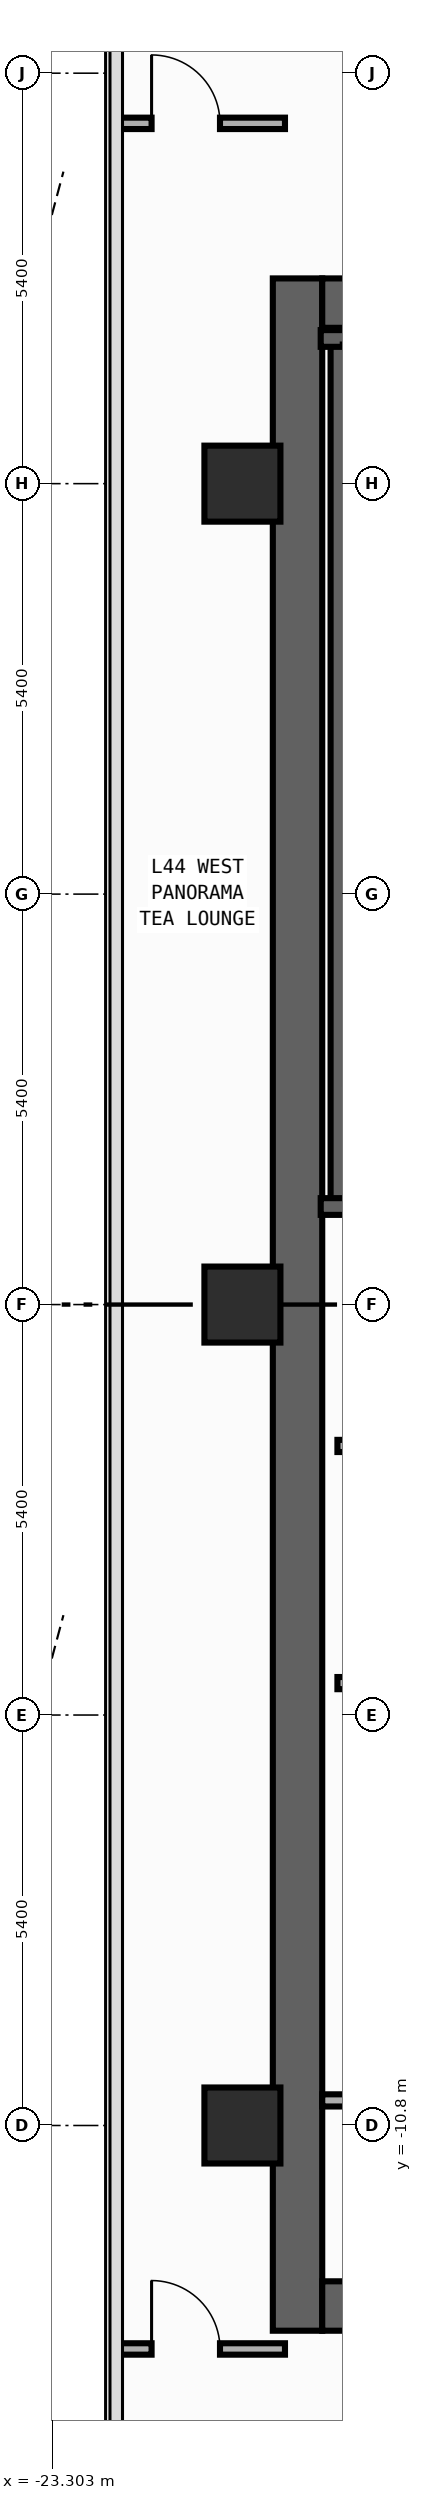
"""IFC4 building model, lengths in metres.
Left out: names, types, materials, properties, quantities, classifications, styles, units other than length and angle.
Written with IfcOpenShell. Run it as: python <this file> out.ifc"""

import sys

from ifc_helpers import new_model, si_unit, direction, frame, frame_2d, origin, origin_2d, place, context, subcontext, project, spatial, rectangle, extrude, element, fill, save


model = new_model("IFC4")
c1 = context("Model", 3, precision=1e-05, world=origin(), true_north=direction((0.0, 1.0)))
c2 = subcontext(c1, "Body", "Model", "MODEL_VIEW")
j1 = project(units=[si_unit("LENGTHUNIT", "METRE"), si_unit("PLANEANGLEUNIT", "RADIAN")], contexts=[c1])
p1 = place(None, origin())
s1 = spatial("IfcSite", under=j1, at=p1, CompositionType="ELEMENT")
p2 = place(p1, origin())
s2 = spatial("IfcBuilding", under=s1, at=p2, CompositionType="ELEMENT")
p3 = place(p2, frame((0.0, 0.0, 191.6)))
s3 = spatial("IfcBuildingStorey", under=s2, at=p3, CompositionType="ELEMENT", Elevation=191.6)
p4 = place(p3, frame((-20.075, -13.5, 0.0), z_axis=(0.0, 0.0, 1.0), x_axis=(0.0, 1.0, 0.0)))
e1 = element("IfcWall", 1, at=p4, inside=s3, PredefinedType="SHEAR", context=c2, shape_type="SweptSolid", body=[
    extrude(rectangle(XDim=27.0, YDim=0.65, at=frame_2d((13.5, 0.0))), origin(), (0.0, 0.0, 1.0), 3.54),
])
for number, where, z_axis, x_axis in (
    (2, (-19.75, -13.175, 0.0), (0.0, 0.0, 1.0), (1.0, 0.0, 0.0)),
    (3, (-19.75, 13.175, 0.0), (0.0, 0.0, 1.0), (1.0, 0.0, 0.0)),
):
    element("IfcWall", number, at=place(p3, frame(where, z_axis=z_axis, x_axis=x_axis)), inside=s3, PredefinedType="SHEAR", context=c2, shape_type="SweptSolid", body=[
        extrude(rectangle(XDim=7.1, YDim=0.65, at=frame_2d((3.55, 0.0))), origin(), (0.0, 0.0, 1.0), 3.54),
    ])
p5 = place(p3, frame((-19.53, 1.29, 0.0), z_axis=(0.0, 0.0, 1.0), x_axis=(0.0, 1.0, 0.0)))
e4 = element("IfcWall", 4, at=p5, inside=s3, PredefinedType="SHEAR", context=c2, shape_type="SweptSolid", body=[
    extrude(rectangle(XDim=11.42, YDim=0.22, at=frame_2d((5.71, 0.0))), origin(), (0.0, 0.0, 1.0), 3.54),
])
p6 = place(p3, frame((-19.77, 12.71, 0.0), z_axis=(0.0, 0.0, 1.0), x_axis=(1.0, 0.0, 0.0)))
e5 = element("IfcWall", 5, at=p6, inside=s3, PredefinedType="SHEAR", context=c2, shape_type="SweptSolid", body=[
    extrude(rectangle(XDim=4.065, YDim=0.22, at=frame_2d((2.032, 0.0))), origin(), (0.0, 0.0, 1.0), 3.54),
])
p7 = place(p3, frame((-19.77, 1.29, 0.0), z_axis=(0.0, 0.0, 1.0), x_axis=(1.0, 0.0, 0.0)))
e6 = element("IfcWall", 6, at=p7, inside=s3, PredefinedType="SHEAR", context=c2, shape_type="SweptSolid", body=[
    extrude(rectangle(XDim=4.065, YDim=0.22, at=frame_2d((2.032, 0.0))), origin(), (0.0, 0.0, 1.0), 3.54),
])
p8 = place(p7, frame((1.08, 0.0, 0.0)))
e7 = element("IfcOpeningElement", 7, at=p8, cuts=e6, PredefinedType="OPENING", context=c2, shape_type="SweptSolid", body=[
    extrude(rectangle(XDim=1.1, YDim=2.2, at=frame_2d((0.55, 1.1))), frame((0.0, 0.12, 0.0), z_axis=(0.0, -1.0, 0.0), x_axis=(1.0, 0.0, 0.0)), (0.0, 0.0, 1.0), 0.24),
])
for number, where, z_axis, x_axis in (
    (8, (-20.8, -10.8, 0.0), (0.0, 0.0, 1.0), (1.0, 0.0, 0.0)),
    (9, (-20.8, 0.0, 0.0), (0.0, 0.0, 1.0), (1.0, 0.0, 0.0)),
    (10, (-20.8, 10.8, 0.0), (0.0, 0.0, 1.0), (1.0, 0.0, 0.0)),
):
    element("IfcColumn", number, at=place(p3, frame(where, z_axis=z_axis, x_axis=x_axis)), inside=s3, PredefinedType="COLUMN", context=c2, shape_type="SweptSolid", body=[
        extrude(rectangle(XDim=1.0, YDim=1.0, at=origin_2d()), origin(), (0.0, 0.0, 1.0), 3.8),
    ])
p9 = place(p3, frame((-19.55, -1.86, 0.0), z_axis=(0.0, 0.0, 1.0), x_axis=(1.0, 0.0, 0.0)))
e11 = element("IfcWall", 11, at=p9, inside=s3, PredefinedType="STANDARD", context=c2, shape_type="SweptSolid", body=[
    extrude(rectangle(XDim=3.8, YDim=0.16, at=frame_2d((1.9, 0.0))), origin(), (0.0, 0.0, 1.0), 3.54),
])
p10 = place(p9, frame((1.18, 0.0, 0.0)))
e12 = element("IfcOpeningElement", 12, at=p10, cuts=e11, PredefinedType="OPENING", context=c2, shape_type="SweptSolid", body=[
    extrude(rectangle(XDim=1.15, YDim=2.2, at=frame_2d((0.575, 1.1))), frame((0.0, 0.09, 0.0), z_axis=(0.0, -1.0, 0.0), x_axis=(1.0, 0.0, 0.0)), (0.0, 0.0, 1.0), 0.18),
])
p11 = place(p3, frame((-19.55, -4.98, 0.0), z_axis=(0.0, 0.0, 1.0), x_axis=(1.0, 0.0, 0.0)))
e13 = element("IfcWall", 13, at=p11, inside=s3, PredefinedType="STANDARD", context=c2, shape_type="SweptSolid", body=[
    extrude(rectangle(XDim=3.8, YDim=0.16, at=frame_2d((1.9, 0.0))), origin(), (0.0, 0.0, 1.0), 3.54),
])
p12 = place(p3, frame((-19.75, -10.47, 0.0), z_axis=(0.0, 0.0, 1.0), x_axis=(1.0, 0.0, 0.0)))
e14 = element("IfcWall", 14, at=p12, inside=s3, PredefinedType="PARTITIONING", context=c2, shape_type="SweptSolid", body=[
    extrude(rectangle(XDim=2.44, YDim=0.16, at=frame_2d((1.22, 0.0))), origin(), (0.0, 0.0, 1.0), 3.54),
])
p13 = place(p3, frame((-22.455, 15.54, 0.0), z_axis=(0.0, 0.0, 1.0), x_axis=(1.0, 0.0, 0.0)))
e15 = element("IfcWall", 15, at=p13, inside=s3, PredefinedType="PARTITIONING", context=c2, shape_type="SweptSolid", body=[
    extrude(rectangle(XDim=2.215, YDim=0.15, at=frame_2d((1.107, 0.0))), origin(), (0.0, 0.0, 1.0), 3.54),
])
p14 = place(p13, frame((0.46, 0.0, 0.0)))
e16 = element("IfcOpeningElement", 16, at=p14, cuts=e15, PredefinedType="OPENING", context=c2, shape_type="SweptSolid", body=[
    extrude(rectangle(XDim=0.9, YDim=2.15, at=frame_2d((0.45, 1.075))), frame((0.0, 0.085, 0.0), z_axis=(0.0, -1.0, 0.0), x_axis=(1.0, 0.0, 0.0)), (0.0, 0.0, 1.0), 0.17),
])
p15 = place(p3, frame((-22.455, -13.74, 0.0), z_axis=(0.0, 0.0, 1.0), x_axis=(1.0, 0.0, 0.0)))
e17 = element("IfcWall", 17, at=p15, inside=s3, PredefinedType="PARTITIONING", context=c2, shape_type="SweptSolid", body=[
    extrude(rectangle(XDim=2.215, YDim=0.15, at=frame_2d((1.107, 0.0))), origin(), (0.0, 0.0, 1.0), 3.54),
])
p16 = place(p15, frame((0.46, 0.0, 0.0)))
e18 = element("IfcOpeningElement", 18, at=p16, cuts=e17, PredefinedType="OPENING", context=c2, shape_type="SweptSolid", body=[
    extrude(rectangle(XDim=0.9, YDim=2.15, at=frame_2d((0.45, 1.075))), frame((0.0, 0.085, 0.0), z_axis=(0.0, -1.0, 0.0), x_axis=(1.0, 0.0, 0.0)), (0.0, 0.0, 1.0), 0.17),
])
p17 = place(p14, origin())
e19 = element("IfcDoor", 19, at=p17, inside=s3, OperationType="SINGLE_SWING_LEFT", PredefinedType="DOOR", context=c2, shape_type="SweptSolid", body=[
    extrude(rectangle(XDim=0.9, YDim=2.15, at=frame_2d((0.45, 1.075))), frame((0.0, 0.025, 0.0), z_axis=(0.0, -1.0, 0.0), x_axis=(1.0, 0.0, 0.0)), (0.0, 0.0, 1.0), 0.05),
])
fill(e16, e19)
p18 = place(p16, origin())
e20 = element("IfcDoor", 20, at=p18, inside=s3, OperationType="SINGLE_SWING_LEFT", PredefinedType="DOOR", context=c2, shape_type="SweptSolid", body=[
    extrude(rectangle(XDim=0.9, YDim=2.15, at=frame_2d((0.45, 1.075))), frame((0.0, 0.025, 0.0), z_axis=(0.0, -1.0, 0.0), x_axis=(1.0, 0.0, 0.0)), (0.0, 0.0, 1.0), 0.05),
])
fill(e18, e20)
save(model, sys.argv[1])
